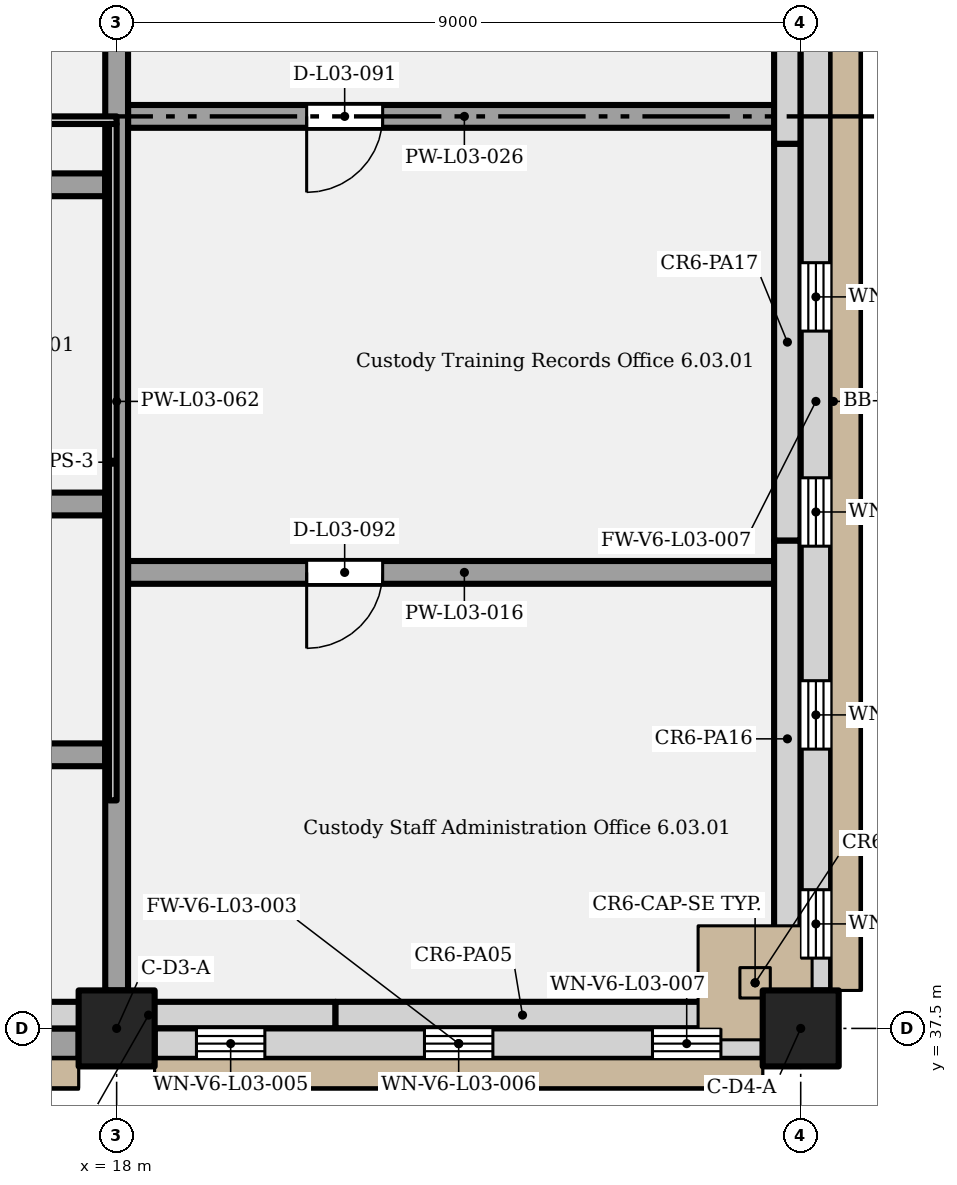
"""IFC4 building model, lengths in metres.
Left out: names, types, materials, properties, quantities, classifications, styles, units other than length and angle.
Written with IfcOpenShell. Run it as: python <this file> out.ifc"""

import sys

from ifc_helpers import new_model, si_unit, direction, frame, frame_2d, origin, origin_2d, place, context, subcontext, project, spatial, rectangle, extrude, element, fill, save


model = new_model("IFC4")
c1 = context("Model", 3, precision=1e-05, world=origin(), true_north=direction((0.0, 1.0)))
c2 = subcontext(c1, "Body", "Model", "MODEL_VIEW")
j1 = project(units=[si_unit("LENGTHUNIT", "METRE"), si_unit("PLANEANGLEUNIT", "RADIAN")], contexts=[c1])
p1 = place(None, origin())
s1 = spatial("IfcSite", under=j1, at=p1, CompositionType="ELEMENT")
p2 = place(p1, origin())
s2 = spatial("IfcBuilding", under=s1, at=p2, CompositionType="ELEMENT")
p3 = place(p2, frame((0.0, 0.0, 17.4)))
s3 = spatial("IfcBuildingStorey", under=s2, at=p3, CompositionType="ELEMENT", Elevation=17.4)
for number, where, z_axis, x_axis in (
    (1, (18.0, 37.5, 0.0), (0.0, 0.0, 1.0), (1.0, 0.0, 0.0)),
    (2, (27.0, 37.5, 0.0), (0.0, 0.0, 1.0), (1.0, 0.0, 0.0)),
):
    element("IfcColumn", number, at=place(p3, frame(where, z_axis=z_axis, x_axis=x_axis)), inside=s3, PredefinedType="COLUMN", context=c2, shape_type="SweptSolid", body=[
        extrude(rectangle(XDim=1.0, YDim=1.0, at=origin_2d()), origin(), (0.0, 0.0, 1.0), 5.4),
    ])
p4 = place(p3, frame((9.5, 37.3, 0.0), z_axis=(0.0, 0.0, 1.0), x_axis=(1.0, 0.0, 0.0)))
e3 = element("IfcWall", 3, at=p4, inside=s3, PredefinedType="SOLIDWALL", context=c2, shape_type="SweptSolid", body=[
    extrude(rectangle(XDim=8.0, YDim=0.4, at=frame_2d((4.0, 0.0))), origin(), (0.0, 0.0, 1.0), 5.15),
])
p5 = place(p4, frame((1.0, 0.0, 0.9)))
e4 = element("IfcOpeningElement", 4, at=p5, cuts=e3, PredefinedType="OPENING", context=c2, shape_type="SweptSolid", body=[
    extrude(rectangle(XDim=6.0, YDim=3.3, at=frame_2d((3.0, 1.65))), frame((0.0, 0.21, 0.0), z_axis=(0.0, -1.0, 0.0), x_axis=(1.0, 0.0, 0.0)), (0.0, 0.0, 1.0), 0.42),
])
p6 = place(p3, frame((18.5, 37.3, 0.0), z_axis=(0.0, 0.0, 1.0), x_axis=(1.0, 0.0, 0.0)))
e5 = element("IfcWall", 5, at=p6, inside=s3, PredefinedType="SOLIDWALL", context=c2, shape_type="SweptSolid", body=[
    extrude(rectangle(XDim=8.0, YDim=0.4, at=frame_2d((4.0, 0.0))), origin(), (0.0, 0.0, 1.0), 5.15),
])
p7 = place(p6, frame((0.55, 0.0, 1.5)))
e6 = element("IfcOpeningElement", 6, at=p7, cuts=e5, PredefinedType="OPENING", context=c2, shape_type="SweptSolid", body=[
    extrude(rectangle(XDim=0.9, YDim=1.8, at=frame_2d((0.45, 0.9))), frame((0.0, 0.21, 0.0), z_axis=(0.0, -1.0, 0.0), x_axis=(1.0, 0.0, 0.0)), (0.0, 0.0, 1.0), 0.42),
])
p8 = place(p6, frame((3.55, 0.0, 1.5)))
e7 = element("IfcOpeningElement", 7, at=p8, cuts=e5, PredefinedType="OPENING", context=c2, shape_type="SweptSolid", body=[
    extrude(rectangle(XDim=0.9, YDim=1.8, at=frame_2d((0.45, 0.9))), frame((0.0, 0.21, 0.0), z_axis=(0.0, -1.0, 0.0), x_axis=(1.0, 0.0, 0.0)), (0.0, 0.0, 1.0), 0.42),
])
p9 = place(p6, frame((6.55, 0.0, 1.5)))
e8 = element("IfcOpeningElement", 8, at=p9, cuts=e5, PredefinedType="OPENING", context=c2, shape_type="SweptSolid", body=[
    extrude(rectangle(XDim=0.9, YDim=1.8, at=frame_2d((0.45, 0.9))), frame((0.0, 0.21, 0.0), z_axis=(0.0, -1.0, 0.0), x_axis=(1.0, 0.0, 0.0)), (0.0, 0.0, 1.0), 0.42),
])
p10 = place(p3, frame((27.2, 38.0, 0.0), z_axis=(0.0, 0.0, 1.0), x_axis=(0.0, 1.0, 0.0)))
e9 = element("IfcWall", 9, at=p10, inside=s3, PredefinedType="SOLIDWALL", context=c2, shape_type="SweptSolid", body=[
    extrude(rectangle(XDim=15.5, YDim=0.4, at=frame_2d((7.75, 0.0))), origin(), (0.0, 0.0, 1.0), 5.15),
])
p11 = place(p10, frame((0.425, 0.0, 1.5)))
e10 = element("IfcOpeningElement", 10, at=p11, cuts=e9, PredefinedType="OPENING", context=c2, shape_type="SweptSolid", body=[
    extrude(rectangle(XDim=0.9, YDim=1.8, at=frame_2d((0.45, 0.9))), frame((0.0, 0.21, 0.0), z_axis=(0.0, -1.0, 0.0), x_axis=(1.0, 0.0, 0.0)), (0.0, 0.0, 1.0), 0.42),
])
p12 = place(p10, frame((3.175, 0.0, 1.5)))
e11 = element("IfcOpeningElement", 11, at=p12, cuts=e9, PredefinedType="OPENING", context=c2, shape_type="SweptSolid", body=[
    extrude(rectangle(XDim=0.9, YDim=1.8, at=frame_2d((0.45, 0.9))), frame((0.0, 0.21, 0.0), z_axis=(0.0, -1.0, 0.0), x_axis=(1.0, 0.0, 0.0)), (0.0, 0.0, 1.0), 0.42),
])
p13 = place(p10, frame((5.845, 0.0, 1.5)))
e12 = element("IfcOpeningElement", 12, at=p13, cuts=e9, PredefinedType="OPENING", context=c2, shape_type="SweptSolid", body=[
    extrude(rectangle(XDim=0.9, YDim=1.8, at=frame_2d((0.45, 0.9))), frame((0.0, 0.21, 0.0), z_axis=(0.0, -1.0, 0.0), x_axis=(1.0, 0.0, 0.0)), (0.0, 0.0, 1.0), 0.42),
])
p14 = place(p10, frame((8.675, 0.0, 1.5)))
e13 = element("IfcOpeningElement", 13, at=p14, cuts=e9, PredefinedType="OPENING", context=c2, shape_type="SweptSolid", body=[
    extrude(rectangle(XDim=0.9, YDim=1.8, at=frame_2d((0.45, 0.9))), frame((0.0, 0.21, 0.0), z_axis=(0.0, -1.0, 0.0), x_axis=(1.0, 0.0, 0.0)), (0.0, 0.0, 1.0), 0.42),
])
p15 = place(p10, frame((14.175, 0.0, 1.5)))
e14 = element("IfcOpeningElement", 14, at=p15, cuts=e9, PredefinedType="OPENING", context=c2, shape_type="SweptSolid", body=[
    extrude(rectangle(XDim=0.9, YDim=1.8, at=frame_2d((0.45, 0.9))), frame((0.0, 0.21, 0.0), z_axis=(0.0, -1.0, 0.0), x_axis=(1.0, 0.0, 0.0)), (0.0, 0.0, 1.0), 0.42),
])
p16 = place(p3, frame((25.8, 38.1, 5.4), z_axis=(0.0, 0.0, 1.0), x_axis=(1.0, 0.0, 0.0)))
e15 = element("IfcWall", 15, at=p16, inside=s3, PredefinedType="SOLIDWALL", context=c2, shape_type="SweptSolid", body=[
    extrude(rectangle(XDim=1.2, YDim=1.2, at=frame_2d((0.6, 0.0))), origin(), (0.0, 0.0, 1.0), 2.4),
])
p17 = place(p3, frame((15.96, 37.675, 5.4), z_axis=(0.0, 0.0, 1.0), x_axis=(1.0, 0.0, 0.0)))
e16 = element("IfcWall", 16, at=p17, inside=s3, PredefinedType="PARAPET", context=c2, shape_type="SweptSolid", body=[
    extrude(rectangle(XDim=4.92, YDim=0.35, at=frame_2d((2.46, 0.0))), origin(), (0.0, 0.0, 1.0), 1.5),
])
p18 = place(p3, frame((20.88, 37.675, 5.4), z_axis=(0.0, 0.0, 1.0), x_axis=(1.0, 0.0, 0.0)))
e17 = element("IfcWall", 17, at=p18, inside=s3, PredefinedType="PARAPET", context=c2, shape_type="SweptSolid", body=[
    extrude(rectangle(XDim=4.92, YDim=0.35, at=frame_2d((2.46, 0.0))), origin(), (0.0, 0.0, 1.0), 1.2),
])
p19 = place(p3, frame((26.825, 38.7, 5.4), z_axis=(0.0, 0.0, 1.0), x_axis=(0.0, 1.0, 0.0)))
e18 = element("IfcWall", 18, at=p19, inside=s3, PredefinedType="PARAPET", context=c2, shape_type="SweptSolid", body=[
    extrude(rectangle(XDim=5.22, YDim=0.35, at=frame_2d((2.61, 0.0))), origin(), (0.0, 0.0, 1.0), 1.2),
])
p20 = place(p3, frame((26.825, 43.92, 5.4), z_axis=(0.0, 0.0, 1.0), x_axis=(0.0, 1.0, 0.0)))
e19 = element("IfcWall", 19, at=p20, inside=s3, PredefinedType="PARAPET", context=c2, shape_type="SweptSolid", body=[
    extrude(rectangle(XDim=5.22, YDim=0.35, at=frame_2d((2.61, 0.0))), origin(), (0.0, 0.0, 1.0), 1.5),
])
p21 = place(p3, frame((26.825, 49.14, 5.4), z_axis=(0.0, 0.0, 1.0), x_axis=(0.0, 1.0, 0.0)))
e20 = element("IfcWall", 20, at=p21, inside=s3, PredefinedType="PARAPET", context=c2, shape_type="SweptSolid", body=[
    extrude(rectangle(XDim=5.22, YDim=0.35, at=frame_2d((2.61, 0.0))), origin(), (0.0, 0.0, 1.0), 1.8),
])
p22 = place(p3, frame((9.0, 49.45, 5.4), z_axis=(0.0, 0.0, 1.0), x_axis=(1.0, 0.0, 0.0)))
e21 = element("IfcWall", 21, at=p22, inside=s3, PredefinedType="SOLIDWALL", context=c2, shape_type="SweptSolid", body=[
    extrude(rectangle(XDim=9.0, YDim=0.1, at=frame_2d((4.5, 0.0))), origin(), (0.0, 0.0, 1.0), 2.4),
])
p23 = place(p3, frame((17.95, 40.5, 5.4), z_axis=(0.0, 0.0, 1.0), x_axis=(0.0, 1.0, 0.0)))
e22 = element("IfcWall", 22, at=p23, inside=s3, PredefinedType="SOLIDWALL", context=c2, shape_type="SweptSolid", body=[
    extrude(rectangle(XDim=8.9, YDim=0.1, at=frame_2d((4.45, 0.0))), origin(), (0.0, 0.0, 1.0), 2.4),
])
p24 = place(p3, frame((9.0, 41.1, 0.0), z_axis=(0.0, 0.0, 1.0), x_axis=(1.0, 0.0, 0.0)))
e23 = element("IfcWall", 23, at=p24, inside=s3, PredefinedType="PARTITIONING", context=c2, shape_type="SweptSolid", body=[
    extrude(rectangle(XDim=8.85, YDim=0.3, at=frame_2d((4.425, 0.0))), origin(), (0.0, 0.0, 1.0), 5.15),
])
p25 = place(p24, frame((1.7, 0.0, 0.0), z_axis=(0.0, 0.0, 1.0), x_axis=(-1.0, 0.0, 0.0)))
e24 = element("IfcOpeningElement", 24, at=p25, cuts=e23, PredefinedType="OPENING", context=c2, shape_type="SweptSolid", body=[
    extrude(rectangle(XDim=1.0, YDim=2.1, at=frame_2d((0.5, 1.05))), frame((0.0, 0.16, 0.0), z_axis=(0.0, -1.0, 0.0), x_axis=(1.0, 0.0, 0.0)), (0.0, 0.0, 1.0), 0.32),
])
p26 = place(p3, frame((18.15, 43.5, 0.0), z_axis=(0.0, 0.0, 1.0), x_axis=(1.0, 0.0, 0.0)))
e25 = element("IfcWall", 25, at=p26, inside=s3, PredefinedType="PARTITIONING", context=c2, shape_type="SweptSolid", body=[
    extrude(rectangle(XDim=8.85, YDim=0.3, at=frame_2d((4.425, 0.0))), origin(), (0.0, 0.0, 1.0), 5.15),
])
p27 = place(p26, frame((3.35, 0.0, 0.0), z_axis=(0.0, 0.0, 1.0), x_axis=(-1.0, 0.0, 0.0)))
e26 = element("IfcOpeningElement", 26, at=p27, cuts=e25, PredefinedType="OPENING", context=c2, shape_type="SweptSolid", body=[
    extrude(rectangle(XDim=1.0, YDim=2.1, at=frame_2d((0.5, 1.05))), frame((0.0, 0.16, 0.0), z_axis=(0.0, -1.0, 0.0), x_axis=(1.0, 0.0, 0.0)), (0.0, 0.0, 1.0), 0.32),
])
for number, where, z_axis, x_axis in (
    (27, (11.55, 44.4, 0.0), (0.0, 0.0, 1.0), (1.0, 0.0, 0.0)),
    (28, (11.55, 48.6, 0.0), (0.0, 0.0, 1.0), (1.0, 0.0, 0.0)),
):
    element("IfcWall", number, at=place(p3, frame(where, z_axis=z_axis, x_axis=x_axis)), inside=s3, PredefinedType="PARTITIONING", context=c2, shape_type="SweptSolid", body=[
        extrude(rectangle(XDim=6.3, YDim=0.3, at=frame_2d((3.15, 0.0))), origin(), (0.0, 0.0, 1.0), 5.15),
    ])
p28 = place(p3, frame((18.15, 49.5, 0.0), z_axis=(0.0, 0.0, 1.0), x_axis=(1.0, 0.0, 0.0)))
e29 = element("IfcWall", 29, at=p28, inside=s3, PredefinedType="PARTITIONING", context=c2, shape_type="SweptSolid", body=[
    extrude(rectangle(XDim=8.85, YDim=0.3, at=frame_2d((4.425, 0.0))), origin(), (0.0, 0.0, 1.0), 5.15),
])
p29 = place(p28, frame((3.35, 0.0, 0.0), z_axis=(0.0, 0.0, 1.0), x_axis=(-1.0, 0.0, 0.0)))
e30 = element("IfcOpeningElement", 30, at=p29, cuts=e29, PredefinedType="OPENING", context=c2, shape_type="SweptSolid", body=[
    extrude(rectangle(XDim=1.0, YDim=2.1, at=frame_2d((0.5, 1.05))), frame((0.0, 0.16, 0.0), z_axis=(0.0, -1.0, 0.0), x_axis=(1.0, 0.0, 0.0)), (0.0, 0.0, 1.0), 0.32),
])
p30 = place(p3, frame((18.0, 38.0, 0.0), z_axis=(0.0, 0.0, 1.0), x_axis=(0.0, 1.0, 0.0)))
e31 = element("IfcWall", 31, at=p30, inside=s3, PredefinedType="PARTITIONING", context=c2, shape_type="SweptSolid", body=[
    extrude(rectangle(XDim=15.5, YDim=0.3, at=frame_2d((7.75, 0.0))), origin(), (0.0, 0.0, 1.0), 4.2),
])
p31 = place(p7, origin())
e32 = element("IfcWindow", 32, at=p31, inside=s3, PartitioningType="SINGLE_PANEL", PredefinedType="WINDOW", context=c2, shape_type="SweptSolid", body=[
    extrude(rectangle(XDim=0.9, YDim=1.8, at=frame_2d((0.45, 0.9))), frame((0.0, 0.03, 0.0), z_axis=(0.0, -1.0, 0.0), x_axis=(1.0, 0.0, 0.0)), (0.0, 0.0, 1.0), 0.06),
])
fill(e6, e32)
p32 = place(p8, origin())
e33 = element("IfcWindow", 33, at=p32, inside=s3, PartitioningType="SINGLE_PANEL", PredefinedType="WINDOW", context=c2, shape_type="SweptSolid", body=[
    extrude(rectangle(XDim=0.9, YDim=1.8, at=frame_2d((0.45, 0.9))), frame((0.0, 0.03, 0.0), z_axis=(0.0, -1.0, 0.0), x_axis=(1.0, 0.0, 0.0)), (0.0, 0.0, 1.0), 0.06),
])
fill(e7, e33)
p33 = place(p9, origin())
e34 = element("IfcWindow", 34, at=p33, inside=s3, PartitioningType="SINGLE_PANEL", PredefinedType="WINDOW", context=c2, shape_type="SweptSolid", body=[
    extrude(rectangle(XDim=0.9, YDim=1.8, at=frame_2d((0.45, 0.9))), frame((0.0, 0.03, 0.0), z_axis=(0.0, -1.0, 0.0), x_axis=(1.0, 0.0, 0.0)), (0.0, 0.0, 1.0), 0.06),
])
fill(e8, e34)
p34 = place(p11, origin())
e35 = element("IfcWindow", 35, at=p34, inside=s3, PartitioningType="SINGLE_PANEL", PredefinedType="WINDOW", context=c2, shape_type="SweptSolid", body=[
    extrude(rectangle(XDim=0.9, YDim=1.8, at=frame_2d((0.45, 0.9))), frame((0.0, 0.03, 0.0), z_axis=(0.0, -1.0, 0.0), x_axis=(1.0, 0.0, 0.0)), (0.0, 0.0, 1.0), 0.06),
])
fill(e10, e35)
p35 = place(p12, origin())
e36 = element("IfcWindow", 36, at=p35, inside=s3, PartitioningType="SINGLE_PANEL", PredefinedType="WINDOW", context=c2, shape_type="SweptSolid", body=[
    extrude(rectangle(XDim=0.9, YDim=1.8, at=frame_2d((0.45, 0.9))), frame((0.0, 0.03, 0.0), z_axis=(0.0, -1.0, 0.0), x_axis=(1.0, 0.0, 0.0)), (0.0, 0.0, 1.0), 0.06),
])
fill(e11, e36)
p36 = place(p13, origin())
e37 = element("IfcWindow", 37, at=p36, inside=s3, PartitioningType="SINGLE_PANEL", PredefinedType="WINDOW", context=c2, shape_type="SweptSolid", body=[
    extrude(rectangle(XDim=0.9, YDim=1.8, at=frame_2d((0.45, 0.9))), frame((0.0, 0.03, 0.0), z_axis=(0.0, -1.0, 0.0), x_axis=(1.0, 0.0, 0.0)), (0.0, 0.0, 1.0), 0.06),
])
fill(e12, e37)
p37 = place(p14, origin())
e38 = element("IfcWindow", 38, at=p37, inside=s3, PartitioningType="SINGLE_PANEL", PredefinedType="WINDOW", context=c2, shape_type="SweptSolid", body=[
    extrude(rectangle(XDim=0.9, YDim=1.8, at=frame_2d((0.45, 0.9))), frame((0.0, 0.03, 0.0), z_axis=(0.0, -1.0, 0.0), x_axis=(1.0, 0.0, 0.0)), (0.0, 0.0, 1.0), 0.06),
])
fill(e13, e38)
p38 = place(p29, origin())
e39 = element("IfcDoor", 39, at=p38, inside=s3, OperationType="SINGLE_SWING_RIGHT", PredefinedType="DOOR", context=c2, shape_type="SweptSolid", body=[
    extrude(rectangle(XDim=1.0, YDim=2.1, at=frame_2d((0.5, 1.05))), frame((0.0, 0.025, 0.0), z_axis=(0.0, -1.0, 0.0), x_axis=(1.0, 0.0, 0.0)), (0.0, 0.0, 1.0), 0.05),
])
fill(e30, e39)
p39 = place(p27, origin())
e40 = element("IfcDoor", 40, at=p39, inside=s3, OperationType="SINGLE_SWING_RIGHT", PredefinedType="DOOR", context=c2, shape_type="SweptSolid", body=[
    extrude(rectangle(XDim=1.0, YDim=2.1, at=frame_2d((0.5, 1.05))), frame((0.0, 0.025, 0.0), z_axis=(0.0, -1.0, 0.0), x_axis=(1.0, 0.0, 0.0)), (0.0, 0.0, 1.0), 0.05),
])
fill(e26, e40)
save(model, sys.argv[1])
